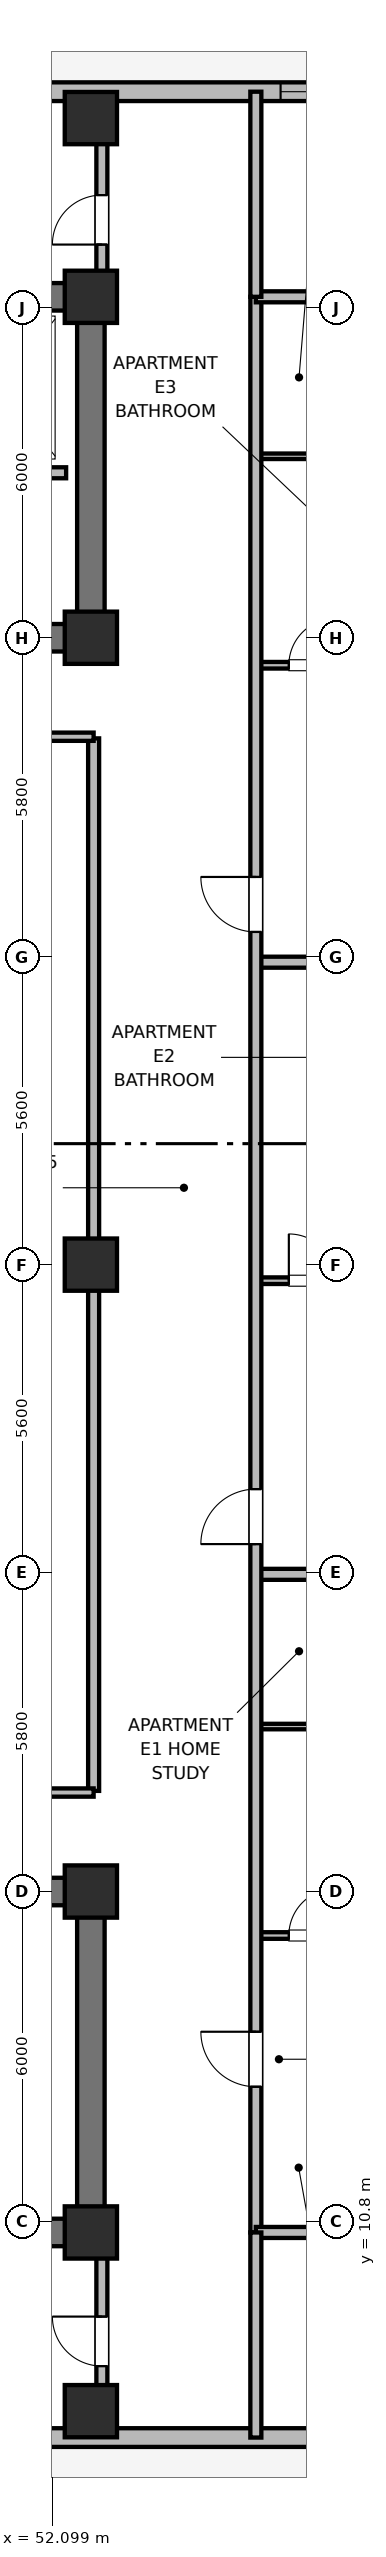
"""IFC4 building model, lengths in metres.
Left out: names, types, materials, properties, quantities, classifications, styles, units other than length and angle.
Written with IfcOpenShell. Run it as: python <this file> out.ifc"""

import sys

from ifc_helpers import new_model, si_unit, direction, frame, frame_2d, origin, origin_2d, place, context, subcontext, project, spatial, rectangle, extrude, element, fill, save


model = new_model("IFC4")
c1 = context("Model", 3, precision=1e-05, world=origin(), true_north=direction((0.0, 1.0)))
c2 = subcontext(c1, "Body", "Model", "MODEL_VIEW")
j1 = project(units=[si_unit("LENGTHUNIT", "METRE"), si_unit("PLANEANGLEUNIT", "RADIAN")], contexts=[c1])
p1 = place(None, origin())
s1 = spatial("IfcSite", under=j1, at=p1, CompositionType="ELEMENT")
p2 = place(p1, origin())
s2 = spatial("IfcBuilding", under=s1, at=p2, CompositionType="ELEMENT")
p3 = place(p2, frame((0.0, 0.0, 143.6)))
s3 = spatial("IfcBuildingStorey", under=s2, at=p3, CompositionType="ELEMENT", Elevation=143.6)
p4 = place(p3, frame((52.8, 10.6, 0.0), z_axis=(0.0, 0.0, 1.0), x_axis=(-1.0, 0.0, 0.0)))
e1 = element("IfcWall", 1, at=p4, inside=s3, PredefinedType="SHEAR", context=c2, shape_type="SweptSolid", body=[
    extrude(rectangle(XDim=27.2, YDim=0.5, at=frame_2d((13.6, 0.0))), origin(), (0.0, 0.0, 1.0), 4.2),
])
p5 = place(p3, frame((52.8, 10.85, 0.0), z_axis=(0.0, 0.0, 1.0), x_axis=(0.0, 1.0, 0.0)))
e2 = element("IfcWall", 2, at=p5, inside=s3, PredefinedType="SHEAR", context=c2, shape_type="SweptSolid", body=[
    extrude(rectangle(XDim=5.7, YDim=0.5, at=frame_2d((2.85, 0.0))), origin(), (0.0, 0.0, 1.0), 4.2),
])
p6 = place(p3, frame((25.6, 16.8, 0.0), z_axis=(0.0, 0.0, 1.0), x_axis=(1.0, 0.0, 0.0)))
e3 = element("IfcWall", 3, at=p6, inside=s3, PredefinedType="SHEAR", context=c2, shape_type="SweptSolid", body=[
    extrude(rectangle(XDim=27.2, YDim=0.5, at=frame_2d((13.6, 0.0))), origin(), (0.0, 0.0, 1.0), 4.2),
])
p7 = place(p6, frame((1.8, 0.0, 0.0)))
e4 = element("IfcOpeningElement", 4, at=p7, cuts=e3, PredefinedType="OPENING", context=c2, shape_type="SweptSolid", body=[
    extrude(rectangle(XDim=1.1, YDim=2.15, at=frame_2d((0.55, 1.075))), frame((0.0, 0.26, 0.0), z_axis=(0.0, -1.0, 0.0), x_axis=(1.0, 0.0, 0.0)), (0.0, 0.0, 1.0), 0.52),
])
p8 = place(p6, frame((5.6, 0.0, 0.0)))
e5 = element("IfcOpeningElement", 5, at=p8, cuts=e3, PredefinedType="OPENING", context=c2, shape_type="SweptSolid", body=[
    extrude(rectangle(XDim=0.85, YDim=2.1, at=frame_2d((0.425, 1.05))), frame((0.0, 0.26, 0.0), z_axis=(0.0, -1.0, 0.0), x_axis=(1.0, 0.0, 0.0)), (0.0, 0.0, 1.0), 0.52),
])
p9 = place(p6, frame((13.0, 0.0, 0.0)))
e6 = element("IfcOpeningElement", 6, at=p9, cuts=e3, PredefinedType="OPENING", context=c2, shape_type="SweptSolid", body=[
    extrude(rectangle(XDim=1.2, YDim=2.15, at=frame_2d((0.6, 1.075))), frame((0.0, 0.26, 0.0), z_axis=(0.0, -1.0, 0.0), x_axis=(1.0, 0.0, 0.0)), (0.0, 0.0, 1.0), 0.52),
])
p10 = place(p6, frame((19.2, 0.0, 0.0)))
e7 = element("IfcOpeningElement", 7, at=p10, cuts=e3, PredefinedType="OPENING", context=c2, shape_type="SweptSolid", body=[
    extrude(rectangle(XDim=0.85, YDim=2.1, at=frame_2d((0.425, 1.05))), frame((0.0, 0.26, 0.0), z_axis=(0.0, -1.0, 0.0), x_axis=(1.0, 0.0, 0.0)), (0.0, 0.0, 1.0), 0.52),
])
p11 = place(p6, frame((23.8, 0.0, 0.0)))
e8 = element("IfcOpeningElement", 8, at=p11, cuts=e3, PredefinedType="OPENING", context=c2, shape_type="SweptSolid", body=[
    extrude(rectangle(XDim=0.9, YDim=2.1, at=frame_2d((0.45, 1.05))), frame((0.0, 0.26, 0.0), z_axis=(0.0, -1.0, 0.0), x_axis=(1.0, 0.0, 0.0)), (0.0, 0.0, 1.0), 0.52),
])
p12 = place(p3, frame((25.6, 45.8, 0.0), z_axis=(0.0, 0.0, 1.0), x_axis=(1.0, 0.0, 0.0)))
e9 = element("IfcWall", 9, at=p12, inside=s3, PredefinedType="SHEAR", context=c2, shape_type="SweptSolid", body=[
    extrude(rectangle(XDim=27.2, YDim=0.5, at=frame_2d((13.6, 0.0))), origin(), (0.0, 0.0, 1.0), 4.2),
])
p13 = place(p3, frame((52.8, 39.85, 0.0), z_axis=(0.0, 0.0, 1.0), x_axis=(0.0, 1.0, 0.0)))
e10 = element("IfcWall", 10, at=p13, inside=s3, PredefinedType="SHEAR", context=c2, shape_type="SweptSolid", body=[
    extrude(rectangle(XDim=5.7, YDim=0.5, at=frame_2d((2.85, 0.0))), origin(), (0.0, 0.0, 1.0), 4.2),
])
p14 = place(p3, frame((52.8, 39.6, 0.0), z_axis=(0.0, 0.0, 1.0), x_axis=(-1.0, 0.0, 0.0)))
e11 = element("IfcWall", 11, at=p14, inside=s3, PredefinedType="SHEAR", context=c2, shape_type="SweptSolid", body=[
    extrude(rectangle(XDim=27.2, YDim=0.5, at=frame_2d((13.6, 0.0))), origin(), (0.0, 0.0, 1.0), 4.2),
])
p15 = place(p14, frame((24.2, 0.0, 0.0)))
e12 = element("IfcOpeningElement", 12, at=p15, cuts=e11, PredefinedType="OPENING", context=c2, shape_type="SweptSolid", body=[
    extrude(rectangle(XDim=1.1, YDim=2.15, at=frame_2d((0.55, 1.075))), frame((0.0, 0.26, 0.0), z_axis=(0.0, -1.0, 0.0), x_axis=(1.0, 0.0, 0.0)), (0.0, 0.0, 1.0), 0.52),
])
p16 = place(p14, frame((20.55, 0.0, 0.0)))
e13 = element("IfcOpeningElement", 13, at=p16, cuts=e11, PredefinedType="OPENING", context=c2, shape_type="SweptSolid", body=[
    extrude(rectangle(XDim=0.95, YDim=2.1, at=frame_2d((0.475, 1.05))), frame((0.0, 0.26, 0.0), z_axis=(0.0, -1.0, 0.0), x_axis=(1.0, 0.0, 0.0)), (0.0, 0.0, 1.0), 0.52),
])
p17 = place(p14, frame((15.1, 0.0, 0.0)))
e14 = element("IfcOpeningElement", 14, at=p17, cuts=e11, PredefinedType="OPENING", context=c2, shape_type="SweptSolid", body=[
    extrude(rectangle(XDim=1.2, YDim=2.15, at=frame_2d((0.6, 1.075))), frame((0.0, 0.26, 0.0), z_axis=(0.0, -1.0, 0.0), x_axis=(1.0, 0.0, 0.0)), (0.0, 0.0, 1.0), 0.52),
])
p18 = place(p14, frame((11.3, 0.0, 0.0)))
e15 = element("IfcOpeningElement", 15, at=p18, cuts=e11, PredefinedType="OPENING", context=c2, shape_type="SweptSolid", body=[
    extrude(rectangle(XDim=1.3, YDim=2.2, at=frame_2d((0.65, 1.1))), frame((0.0, 0.26, 0.0), z_axis=(0.0, -1.0, 0.0), x_axis=(1.0, 0.0, 0.0)), (0.0, 0.0, 1.0), 0.52),
])
p19 = place(p14, frame((4.2, 0.0, 0.0)))
e16 = element("IfcOpeningElement", 16, at=p19, cuts=e11, PredefinedType="OPENING", context=c2, shape_type="SweptSolid", body=[
    extrude(rectangle(XDim=1.3, YDim=2.2, at=frame_2d((0.65, 1.1))), frame((0.0, 0.26, 0.0), z_axis=(0.0, -1.0, 0.0), x_axis=(1.0, 0.0, 0.0)), (0.0, 0.0, 1.0), 0.52),
])
for number, where, z_axis, x_axis in (
    (17, (52.8, 10.6, 0.0), (0.0, 0.0, 1.0), (1.0, 0.0, 0.0)),
    (18, (52.8, 16.8, 0.0), (0.0, 0.0, 1.0), (1.0, 0.0, 0.0)),
    (19, (52.8, 39.6, 0.0), (0.0, 0.0, 1.0), (1.0, 0.0, 0.0)),
    (20, (52.8, 45.8, 0.0), (0.0, 0.0, 1.0), (1.0, 0.0, 0.0)),
    (21, (52.8, 28.2, 0.0), (0.0, 0.0, 1.0), (1.0, 0.0, 0.0)),
    (22, (52.8, 7.35, 0.0), (0.0, 0.0, 1.0), (1.0, 0.0, 0.0)),
    (23, (52.8, 49.05, 0.0), (0.0, 0.0, 1.0), (1.0, 0.0, 0.0)),
):
    element("IfcColumn", number, at=place(p3, frame(where, z_axis=z_axis, x_axis=x_axis)), inside=s3, PredefinedType="COLUMN", context=c2, shape_type="SweptSolid", body=[
        extrude(rectangle(XDim=0.95, YDim=0.95, at=origin_2d()), origin(), (0.0, 0.0, 1.0), 4.2),
    ])
p20 = place(p3, frame((51.25, 6.87, 0.0), z_axis=(0.0, 0.0, 1.0), x_axis=(1.0, 0.0, 0.0)))
e24 = element("IfcWall", 24, at=p20, inside=s3, PredefinedType="SOLIDWALL", context=c2, shape_type="SweptSolid", body=[
    extrude(rectangle(XDim=6.95, YDim=0.34, at=frame_2d((3.475, 0.0))), origin(), (0.0, 0.0, 1.0), 3.22),
])
p21 = place(p3, frame((58.2, 49.53, 0.0), z_axis=(0.0, 0.0, 1.0), x_axis=(-1.0, 0.0, 0.0)))
e25 = element("IfcWall", 25, at=p21, inside=s3, PredefinedType="SOLIDWALL", context=c2, shape_type="SweptSolid", body=[
    extrude(rectangle(XDim=15.8, YDim=0.34, at=frame_2d((7.9, 0.0))), origin(), (0.0, 0.0, 1.0), 3.22),
])
p22 = place(p21, frame((0.85, 0.0, 0.95)))
e26 = element("IfcOpeningElement", 26, at=p22, cuts=e25, PredefinedType="OPENING", context=c2, shape_type="SweptSolid", body=[
    extrude(rectangle(XDim=1.1, YDim=1.65, at=frame_2d((0.55, 0.825))), frame((0.0, 0.18, 0.0), z_axis=(0.0, -1.0, 0.0), x_axis=(1.0, 0.0, 0.0)), (0.0, 0.0, 1.0), 0.36),
])
p23 = place(p21, frame((7.35, 0.0, 0.95)))
e27 = element("IfcOpeningElement", 27, at=p23, cuts=e25, PredefinedType="OPENING", context=c2, shape_type="SweptSolid", body=[
    extrude(rectangle(XDim=1.1, YDim=1.65, at=frame_2d((0.55, 0.825))), frame((0.0, 0.18, 0.0), z_axis=(0.0, -1.0, 0.0), x_axis=(1.0, 0.0, 0.0)), (0.0, 0.0, 1.0), 0.36),
])
p24 = place(p21, frame((11.3, 0.0, 0.95)))
e28 = element("IfcOpeningElement", 28, at=p24, cuts=e25, PredefinedType="OPENING", context=c2, shape_type="SweptSolid", body=[
    extrude(rectangle(XDim=1.1, YDim=1.65, at=frame_2d((0.55, 0.825))), frame((0.0, 0.18, 0.0), z_axis=(0.0, -1.0, 0.0), x_axis=(1.0, 0.0, 0.0)), (0.0, 0.0, 1.0), 0.36),
])
p25 = place(p3, frame((52.35, 42.6, 0.0), z_axis=(0.0, 0.0, 1.0), x_axis=(-1.0, 0.0, 0.0)))
e29 = element("IfcWall", 29, at=p25, inside=s3, PredefinedType="PARTITIONING", context=c2, shape_type="SweptSolid", body=[
    extrude(rectangle(XDim=8.8, YDim=0.2, at=frame_2d((4.4, 0.0))), origin(), (0.0, 0.0, 1.0), 3.05),
])
p26 = place(p25, frame((7.1, 0.0, 0.0)))
e30 = element("IfcOpeningElement", 30, at=p26, cuts=e29, PredefinedType="OPENING", context=c2, shape_type="SweptSolid", body=[
    extrude(rectangle(XDim=1.0, YDim=2.15, at=frame_2d((0.5, 1.075))), frame((0.0, 0.11, 0.0), z_axis=(0.0, -1.0, 0.0), x_axis=(1.0, 0.0, 0.0)), (0.0, 0.0, 1.0), 0.22),
])
p27 = place(p25, frame((4.9, 0.0, 0.0)))
e31 = element("IfcOpeningElement", 31, at=p27, cuts=e29, PredefinedType="OPENING", context=c2, shape_type="SweptSolid", body=[
    extrude(rectangle(XDim=1.0, YDim=2.15, at=frame_2d((0.5, 1.075))), frame((0.0, 0.11, 0.0), z_axis=(0.0, -1.0, 0.0), x_axis=(1.0, 0.0, 0.0)), (0.0, 0.0, 1.0), 0.22),
])
p28 = place(p25, frame((2.8, 0.0, 0.0)))
e32 = element("IfcOpeningElement", 32, at=p28, cuts=e29, PredefinedType="OPENING", context=c2, shape_type="SweptSolid", body=[
    extrude(rectangle(XDim=1.0, YDim=2.15, at=frame_2d((0.5, 1.075))), frame((0.0, 0.11, 0.0), z_axis=(0.0, -1.0, 0.0), x_axis=(1.0, 0.0, 0.0)), (0.0, 0.0, 1.0), 0.22),
])
p29 = place(p25, frame((0.7, 0.0, 0.0)))
e33 = element("IfcOpeningElement", 33, at=p29, cuts=e29, PredefinedType="OPENING", context=c2, shape_type="SweptSolid", body=[
    extrude(rectangle(XDim=1.0, YDim=2.15, at=frame_2d((0.5, 1.075))), frame((0.0, 0.11, 0.0), z_axis=(0.0, -1.0, 0.0), x_axis=(1.0, 0.0, 0.0)), (0.0, 0.0, 1.0), 0.22),
])
p30 = place(p3, frame((52.85, 18.63, 0.0), z_axis=(0.0, 0.0, 1.0), x_axis=(0.0, 1.0, 0.0)))
e34 = element("IfcWall", 34, at=p30, inside=s3, PredefinedType="PARTITIONING", context=c2, shape_type="SweptSolid", body=[
    extrude(rectangle(XDim=19.14, YDim=0.2, at=frame_2d((9.57, 0.0))), origin(), (0.0, 0.0, 1.0), 3.05),
])
for number, where, z_axis, x_axis in (
    (35, (46.35, 18.6, 0.0), (0.0, 0.0, 1.0), (1.0, 0.0, 0.0)),
    (36, (46.35, 37.8, 0.0), (0.0, 0.0, 1.0), (1.0, 0.0, 0.0)),
):
    element("IfcWall", number, at=place(p3, frame(where, z_axis=z_axis, x_axis=x_axis)), inside=s3, PredefinedType="PARTITIONING", context=c2, shape_type="SweptSolid", body=[
        extrude(rectangle(XDim=6.5, YDim=0.15, at=frame_2d((3.25, 0.0))), origin(), (0.0, 0.0, 1.0), 3.05),
    ])
p31 = place(p3, frame((55.8, 16.0, 0.0), z_axis=(0.0, 0.0, 1.0), x_axis=(1.0, 0.0, 0.0)))
e37 = element("IfcWall", 37, at=p31, inside=s3, PredefinedType="PARTITIONING", context=c2, shape_type="SweptSolid", body=[
    extrude(rectangle(XDim=2.25, YDim=0.12, at=frame_2d((1.125, 0.0))), origin(), (0.0, 0.0, 1.0), 3.05),
])
p32 = place(p31, frame((0.6, 0.0, 0.0)))
e38 = element("IfcOpeningElement", 38, at=p32, cuts=e37, PredefinedType="OPENING", context=c2, shape_type="SweptSolid", body=[
    extrude(rectangle(XDim=0.85, YDim=2.1, at=frame_2d((0.425, 1.05))), frame((0.0, 0.07, 0.0), z_axis=(0.0, -1.0, 0.0), x_axis=(1.0, 0.0, 0.0)), (0.0, 0.0, 1.0), 0.14),
])
p33 = place(p3, frame((55.8, 19.8, 0.0), z_axis=(0.0, 0.0, 1.0), x_axis=(1.0, 0.0, 0.0)))
e39 = element("IfcWall", 39, at=p33, inside=s3, PredefinedType="PARTITIONING", context=c2, shape_type="SweptSolid", body=[
    extrude(rectangle(XDim=2.25, YDim=0.1, at=frame_2d((1.125, 0.0))), origin(), (0.0, 0.0, 1.0), 3.05),
])
p34 = place(p3, frame((55.8, 22.568, 0.0), z_axis=(0.0, 0.0, 1.0), x_axis=(1.0, 0.0, 0.0)))
e40 = element("IfcWall", 40, at=p34, inside=s3, PredefinedType="PARTITIONING", context=c2, shape_type="SweptSolid", body=[
    extrude(rectangle(XDim=6.03, YDim=0.2, at=frame_2d((3.015, 0.0))), origin(), (0.0, 0.0, 1.0), 3.05),
])
p35 = place(p3, frame((55.8, 27.908, 0.0), z_axis=(0.0, 0.0, 1.0), x_axis=(1.0, 0.0, 0.0)))
e41 = element("IfcWall", 41, at=p35, inside=s3, PredefinedType="PARTITIONING", context=c2, shape_type="SweptSolid", body=[
    extrude(rectangle(XDim=2.25, YDim=0.12, at=frame_2d((1.125, 0.0))), origin(), (0.0, 0.0, 1.0), 3.05),
])
p36 = place(p35, frame((0.6, 0.0, 0.0)))
e42 = element("IfcOpeningElement", 42, at=p36, cuts=e41, PredefinedType="OPENING", context=c2, shape_type="SweptSolid", body=[
    extrude(rectangle(XDim=0.85, YDim=2.1, at=frame_2d((0.425, 1.05))), frame((0.0, 0.07, 0.0), z_axis=(0.0, -1.0, 0.0), x_axis=(1.0, 0.0, 0.0)), (0.0, 0.0, 1.0), 0.14),
])
p37 = place(p3, frame((55.8, 33.7, 0.0), z_axis=(0.0, 0.0, 1.0), x_axis=(1.0, 0.0, 0.0)))
e43 = element("IfcWall", 43, at=p37, inside=s3, PredefinedType="PARTITIONING", context=c2, shape_type="SweptSolid", body=[
    extrude(rectangle(XDim=6.03, YDim=0.2, at=frame_2d((3.015, 0.0))), origin(), (0.0, 0.0, 1.0), 3.05),
])
p38 = place(p3, frame((55.8, 39.1, 0.0), z_axis=(0.0, 0.0, 1.0), x_axis=(1.0, 0.0, 0.0)))
e44 = element("IfcWall", 44, at=p38, inside=s3, PredefinedType="PARTITIONING", context=c2, shape_type="SweptSolid", body=[
    extrude(rectangle(XDim=2.25, YDim=0.12, at=frame_2d((1.125, 0.0))), origin(), (0.0, 0.0, 1.0), 3.05),
])
p39 = place(p38, frame((0.6, 0.0, 0.0)))
e45 = element("IfcOpeningElement", 45, at=p39, cuts=e44, PredefinedType="OPENING", context=c2, shape_type="SweptSolid", body=[
    extrude(rectangle(XDim=0.85, YDim=2.1, at=frame_2d((0.425, 1.05))), frame((0.0, 0.07, 0.0), z_axis=(0.0, -1.0, 0.0), x_axis=(1.0, 0.0, 0.0)), (0.0, 0.0, 1.0), 0.14),
])
p40 = place(p3, frame((55.8, 42.9, 0.0), z_axis=(0.0, 0.0, 1.0), x_axis=(1.0, 0.0, 0.0)))
e46 = element("IfcWall", 46, at=p40, inside=s3, PredefinedType="PARTITIONING", context=c2, shape_type="SweptSolid", body=[
    extrude(rectangle(XDim=2.25, YDim=0.1, at=frame_2d((1.125, 0.0))), origin(), (0.0, 0.0, 1.0), 3.05),
])
p41 = place(p3, frame((55.8, 10.6, 0.0), z_axis=(0.0, 0.0, 1.0), x_axis=(0.0, 1.0, 0.0)))
e47 = element("IfcWall", 47, at=p41, inside=s3, PredefinedType="PARTITIONING", context=c2, shape_type="SweptSolid", body=[
    extrude(rectangle(XDim=35.2, YDim=0.2, at=frame_2d((17.6, 0.0))), origin(), (0.0, 0.0, 1.0), 3.05),
])
p42 = place(p41, frame((2.65, 0.0, 0.0)))
e48 = element("IfcOpeningElement", 48, at=p42, cuts=e47, PredefinedType="OPENING", context=c2, shape_type="SweptSolid", body=[
    extrude(rectangle(XDim=1.0, YDim=2.15, at=frame_2d((0.5, 1.075))), frame((0.0, 0.11, 0.0), z_axis=(0.0, -1.0, 0.0), x_axis=(1.0, 0.0, 0.0)), (0.0, 0.0, 1.0), 0.22),
])
p43 = place(p41, frame((12.518, 0.0, 0.0)))
e49 = element("IfcOpeningElement", 49, at=p43, cuts=e47, PredefinedType="OPENING", context=c2, shape_type="SweptSolid", body=[
    extrude(rectangle(XDim=1.0, YDim=2.15, at=frame_2d((0.5, 1.075))), frame((0.0, 0.11, 0.0), z_axis=(0.0, -1.0, 0.0), x_axis=(1.0, 0.0, 0.0)), (0.0, 0.0, 1.0), 0.22),
])
p44 = place(p41, frame((23.65, 0.0, 0.0)))
e50 = element("IfcOpeningElement", 50, at=p44, cuts=e47, PredefinedType="OPENING", context=c2, shape_type="SweptSolid", body=[
    extrude(rectangle(XDim=1.0, YDim=2.15, at=frame_2d((0.5, 1.075))), frame((0.0, 0.11, 0.0), z_axis=(0.0, -1.0, 0.0), x_axis=(1.0, 0.0, 0.0)), (0.0, 0.0, 1.0), 0.22),
])
for number, where, z_axis, x_axis in (
    (51, (55.8, 10.6, 0.0), (0.0, 0.0, 1.0), (1.0, 0.0, 0.0)),
    (52, (55.8, 45.8, 0.0), (0.0, 0.0, 1.0), (1.0, 0.0, 0.0)),
):
    element("IfcWall", number, at=place(p3, frame(where, z_axis=z_axis, x_axis=x_axis)), inside=s3, PredefinedType="PARTITIONING", context=c2, shape_type="SweptSolid", body=[
        extrude(rectangle(XDim=5.61, YDim=0.2, at=frame_2d((2.805, 0.0))), origin(), (0.0, 0.0, 1.0), 3.05),
    ])
for number, where, z_axis, x_axis in (
    (53, (55.8, 6.87, 0.0), (0.0, 0.0, 1.0), (0.0, 1.0, 0.0)),
    (54, (55.8, 45.8, 0.0), (0.0, 0.0, 1.0), (0.0, 1.0, 0.0)),
):
    element("IfcWall", number, at=place(p3, frame(where, z_axis=z_axis, x_axis=x_axis)), inside=s3, PredefinedType="PARTITIONING", context=c2, shape_type="SweptSolid", body=[
        extrude(rectangle(XDim=3.73, YDim=0.2, at=frame_2d((1.865, 0.0))), origin(), (0.0, 0.0, 1.0), 3.05),
    ])
p45 = place(p3, frame((53.0, 7.52, 0.0), z_axis=(0.0, 0.0, 1.0), x_axis=(0.0, 1.0, 0.0)))
e55 = element("IfcWall", 55, at=p45, inside=s3, PredefinedType="PARTITIONING", context=c2, shape_type="SweptSolid", body=[
    extrude(rectangle(XDim=2.78, YDim=0.2, at=frame_2d((1.39, 0.0))), origin(), (0.0, 0.0, 1.0), 3.05),
])
p46 = place(p45, frame((0.65, 0.0, 0.0)))
e56 = element("IfcOpeningElement", 56, at=p46, cuts=e55, PredefinedType="OPENING", context=c2, shape_type="SweptSolid", body=[
    extrude(rectangle(XDim=0.9, YDim=2.1, at=frame_2d((0.45, 1.05))), frame((0.0, 0.11, 0.0), z_axis=(0.0, -1.0, 0.0), x_axis=(1.0, 0.0, 0.0)), (0.0, 0.0, 1.0), 0.22),
])
p47 = place(p3, frame((53.0, 46.1, 0.0), z_axis=(0.0, 0.0, 1.0), x_axis=(0.0, 1.0, 0.0)))
e57 = element("IfcWall", 57, at=p47, inside=s3, PredefinedType="PARTITIONING", context=c2, shape_type="SweptSolid", body=[
    extrude(rectangle(XDim=2.78, YDim=0.2, at=frame_2d((1.39, 0.0))), origin(), (0.0, 0.0, 1.0), 3.05),
])
p48 = place(p47, frame((0.65, 0.0, 0.0)))
e58 = element("IfcOpeningElement", 58, at=p48, cuts=e57, PredefinedType="OPENING", context=c2, shape_type="SweptSolid", body=[
    extrude(rectangle(XDim=0.9, YDim=2.1, at=frame_2d((0.45, 1.05))), frame((0.0, 0.11, 0.0), z_axis=(0.0, -1.0, 0.0), x_axis=(1.0, 0.0, 0.0)), (0.0, 0.0, 1.0), 0.22),
])
p49 = place(p22, origin())
e59 = element("IfcWindow", 59, at=p49, inside=s3, PartitioningType="SINGLE_PANEL", PredefinedType="WINDOW", context=c2, shape_type="SweptSolid", body=[
    extrude(rectangle(XDim=1.1, YDim=1.65, at=frame_2d((0.55, 0.825))), frame((0.0, 0.03, 0.0), z_axis=(0.0, -1.0, 0.0), x_axis=(1.0, 0.0, 0.0)), (0.0, 0.0, 1.0), 0.06),
])
fill(e26, e59)
p50 = place(p32, origin())
e60 = element("IfcDoor", 60, at=p50, inside=s3, OperationType="SINGLE_SWING_RIGHT", PredefinedType="DOOR", context=c2, shape_type="SweptSolid", body=[
    extrude(rectangle(XDim=0.85, YDim=2.1, at=frame_2d((0.425, 1.05))), frame((0.0, 0.025, 0.0), z_axis=(0.0, -1.0, 0.0), x_axis=(1.0, 0.0, 0.0)), (0.0, 0.0, 1.0), 0.05),
])
fill(e38, e60)
p51 = place(p36, origin())
e61 = element("IfcDoor", 61, at=p51, inside=s3, OperationType="SINGLE_SWING_LEFT", PredefinedType="DOOR", context=c2, shape_type="SweptSolid", body=[
    extrude(rectangle(XDim=0.85, YDim=2.1, at=frame_2d((0.425, 1.05))), frame((0.0, 0.025, 0.0), z_axis=(0.0, -1.0, 0.0), x_axis=(1.0, 0.0, 0.0)), (0.0, 0.0, 1.0), 0.05),
])
fill(e42, e61)
p52 = place(p39, origin())
e62 = element("IfcDoor", 62, at=p52, inside=s3, OperationType="SINGLE_SWING_RIGHT", PredefinedType="DOOR", context=c2, shape_type="SweptSolid", body=[
    extrude(rectangle(XDim=0.85, YDim=2.1, at=frame_2d((0.425, 1.05))), frame((0.0, 0.025, 0.0), z_axis=(0.0, -1.0, 0.0), x_axis=(1.0, 0.0, 0.0)), (0.0, 0.0, 1.0), 0.05),
])
fill(e45, e62)
p53 = place(p42, origin())
e63 = element("IfcDoor", 63, at=p53, inside=s3, OperationType="SINGLE_SWING_RIGHT", PredefinedType="DOOR", context=c2, shape_type="SweptSolid", body=[
    extrude(rectangle(XDim=1.0, YDim=2.15, at=frame_2d((0.5, 1.075))), frame((0.0, 0.025, 0.0), z_axis=(0.0, -1.0, 0.0), x_axis=(1.0, 0.0, 0.0)), (0.0, 0.0, 1.0), 0.05),
])
fill(e48, e63)
p54 = place(p43, origin())
e64 = element("IfcDoor", 64, at=p54, inside=s3, OperationType="SINGLE_SWING_LEFT", PredefinedType="DOOR", context=c2, shape_type="SweptSolid", body=[
    extrude(rectangle(XDim=1.0, YDim=2.15, at=frame_2d((0.5, 1.075))), frame((0.0, 0.025, 0.0), z_axis=(0.0, -1.0, 0.0), x_axis=(1.0, 0.0, 0.0)), (0.0, 0.0, 1.0), 0.05),
])
fill(e49, e64)
p55 = place(p44, origin())
e65 = element("IfcDoor", 65, at=p55, inside=s3, OperationType="SINGLE_SWING_RIGHT", PredefinedType="DOOR", context=c2, shape_type="SweptSolid", body=[
    extrude(rectangle(XDim=1.0, YDim=2.15, at=frame_2d((0.5, 1.075))), frame((0.0, 0.025, 0.0), z_axis=(0.0, -1.0, 0.0), x_axis=(1.0, 0.0, 0.0)), (0.0, 0.0, 1.0), 0.05),
])
fill(e50, e65)
p56 = place(p46, origin())
e66 = element("IfcDoor", 66, at=p56, inside=s3, OperationType="SINGLE_SWING_RIGHT", PredefinedType="DOOR", context=c2, shape_type="SweptSolid", body=[
    extrude(rectangle(XDim=0.9, YDim=2.1, at=frame_2d((0.45, 1.05))), frame((0.0, 0.025, 0.0), z_axis=(0.0, -1.0, 0.0), x_axis=(1.0, 0.0, 0.0)), (0.0, 0.0, 1.0), 0.05),
])
fill(e56, e66)
p57 = place(p48, origin())
e67 = element("IfcDoor", 67, at=p57, inside=s3, OperationType="SINGLE_SWING_LEFT", PredefinedType="DOOR", context=c2, shape_type="SweptSolid", body=[
    extrude(rectangle(XDim=0.9, YDim=2.1, at=frame_2d((0.45, 1.05))), frame((0.0, 0.025, 0.0), z_axis=(0.0, -1.0, 0.0), x_axis=(1.0, 0.0, 0.0)), (0.0, 0.0, 1.0), 0.05),
])
fill(e58, e67)
save(model, sys.argv[1])
